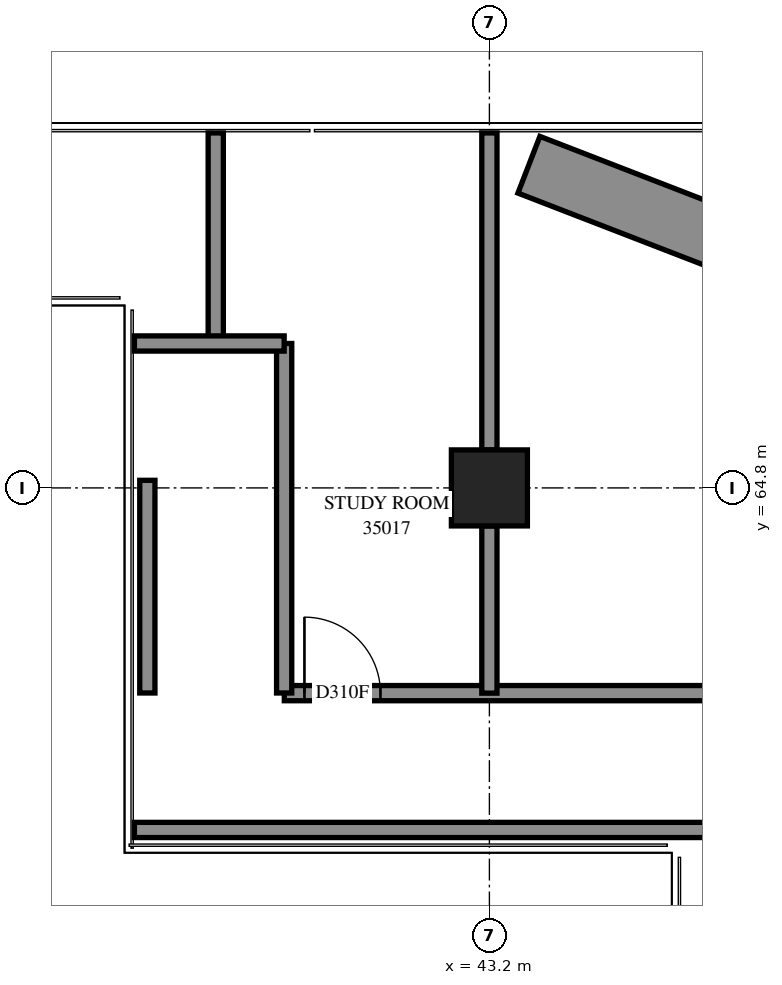
"""IFC4 building model, lengths in metres.
Left out: names, types, materials, properties, quantities, classifications, styles, units other than length and angle.
Written with IfcOpenShell. Run it as: python <this file> out.ifc"""

import sys

from ifc_helpers import new_model, si_unit, direction, frame, frame_2d, origin, origin_2d, place, context, subcontext, project, spatial, rectangle, extrude, element, fill, save


model = new_model("IFC4")
c1 = context("Model", 3, precision=1e-05, world=origin(), true_north=direction((0.0, 1.0)))
c2 = subcontext(c1, "Body", "Model", "MODEL_VIEW")
j1 = project(units=[si_unit("LENGTHUNIT", "METRE"), si_unit("PLANEANGLEUNIT", "RADIAN")], contexts=[c1])
p1 = place(None, origin())
s1 = spatial("IfcSite", under=j1, at=p1, CompositionType="ELEMENT")
p2 = place(p1, origin())
s2 = spatial("IfcBuilding", under=s1, at=p2, CompositionType="ELEMENT")
p3 = place(p2, frame((0.0, 0.0, 131.2)))
s3 = spatial("IfcBuildingStorey", under=s2, at=p3, CompositionType="ELEMENT", Elevation=131.2)
p4 = place(p3, frame((43.2, 64.8, 0.0), z_axis=(0.0, 0.0, 1.0), x_axis=(1.0, 0.0, 0.0)))
e1 = element("IfcColumn", 1, at=p4, inside=s3, PredefinedType="COLUMN", context=c2, shape_type="SweptSolid", body=[
    extrude(rectangle(XDim=1.0, YDim=1.0, at=origin_2d()), origin(), (0.0, 0.0, 1.0), 3.9),
])
p5 = place(p3, frame((46.26, 68.069, 0.0), z_axis=(0.0, 0.0, 1.0), x_axis=(-0.9326139528, 0.3608756227, 0.0)))
e2 = element("IfcWall", 2, at=p5, inside=s3, PredefinedType="SOLIDWALL", context=c2, shape_type="SweptSolid", body=[
    extrude(rectangle(XDim=2.723, YDim=0.8, at=frame_2d((1.362, 0.0))), origin(), (0.0, 0.0, 1.0), 0.65),
])
p6 = place(p3, frame((40.502, 62.1, 0.0), z_axis=(0.0, 0.0, 1.0), x_axis=(1.0, 0.0, 0.0)))
e3 = element("IfcWall", 3, at=p6, inside=s3, PredefinedType="PARTITIONING", context=c2, shape_type="SweptSolid", body=[
    extrude(rectangle(XDim=14.598, YDim=0.2, at=frame_2d((7.299, 0.0))), origin(), (0.0, 0.0, 1.0), 3.9),
])
p7 = place(p6, frame((0.265, 0.0, 0.0)))
e4 = element("IfcOpeningElement", 4, at=p7, cuts=e3, PredefinedType="OPENING", context=c2, shape_type="SweptSolid", body=[
    extrude(rectangle(XDim=1.0, YDim=2.1, at=frame_2d((0.5, 1.05))), frame((0.0, 0.11, 0.0), z_axis=(0.0, -1.0, 0.0), x_axis=(1.0, 0.0, 0.0)), (0.0, 0.0, 1.0), 0.22),
])
p8 = place(p6, frame((11.991, 0.0, 0.0)))
e5 = element("IfcOpeningElement", 5, at=p8, cuts=e3, PredefinedType="OPENING", context=c2, shape_type="SweptSolid", body=[
    extrude(rectangle(XDim=1.0, YDim=2.1, at=frame_2d((0.5, 1.05))), frame((0.0, 0.11, 0.0), z_axis=(0.0, -1.0, 0.0), x_axis=(1.0, 0.0, 0.0)), (0.0, 0.0, 1.0), 0.22),
])
p9 = place(p3, frame((38.53, 60.3, 0.0), z_axis=(0.0, 0.0, 1.0), x_axis=(1.0, 0.0, 0.0)))
e6 = element("IfcWall", 6, at=p9, inside=s3, PredefinedType="PARTITIONING", context=c2, shape_type="SweptSolid", body=[
    extrude(rectangle(XDim=14.57, YDim=0.2, at=frame_2d((7.285, 0.0))), origin(), (0.0, 0.0, 1.0), 3.9),
])
p10 = place(p9, frame((9.105, 0.0, 0.0)))
e7 = element("IfcOpeningElement", 7, at=p10, cuts=e6, PredefinedType="OPENING", context=c2, shape_type="SweptSolid", body=[
    extrude(rectangle(XDim=1.0, YDim=2.1, at=frame_2d((0.5, 1.05))), frame((0.0, 0.11, 0.0), z_axis=(0.0, -1.0, 0.0), x_axis=(1.0, 0.0, 0.0)), (0.0, 0.0, 1.0), 0.22),
])
p11 = place(p9, frame((13.426, 0.0, 0.0)))
e8 = element("IfcOpeningElement", 8, at=p11, cuts=e6, PredefinedType="OPENING", context=c2, shape_type="SweptSolid", body=[
    extrude(rectangle(XDim=1.0, YDim=2.1, at=frame_2d((0.5, 1.05))), frame((0.0, 0.11, 0.0), z_axis=(0.0, -1.0, 0.0), x_axis=(1.0, 0.0, 0.0)), (0.0, 0.0, 1.0), 0.22),
])
p12 = place(p3, frame((40.5, 62.102, 0.0), z_axis=(0.0, 0.0, 1.0), x_axis=(0.0, 1.0, 0.0)))
e9 = element("IfcWall", 9, at=p12, inside=s3, PredefinedType="PARTITIONING", context=c2, shape_type="SweptSolid", body=[
    extrude(rectangle(XDim=4.598, YDim=0.2, at=frame_2d((2.299, 0.0))), origin(), (0.0, 0.0, 1.0), 3.9),
])
p13 = place(p3, frame((43.2, 65.3, 0.0), z_axis=(0.0, 0.0, 1.0), x_axis=(0.0, 1.0, 0.0)))
e10 = element("IfcWall", 10, at=p13, inside=s3, PredefinedType="PARTITIONING", context=c2, shape_type="SweptSolid", body=[
    extrude(rectangle(XDim=4.17, YDim=0.2, at=frame_2d((2.085, 0.0))), origin(), (0.0, 0.0, 1.0), 3.9),
])
p14 = place(p3, frame((38.7, 62.102, 0.0), z_axis=(0.0, 0.0, 1.0), x_axis=(0.0, 1.0, 0.0)))
e11 = element("IfcWall", 11, at=p14, inside=s3, PredefinedType="PARTITIONING", context=c2, shape_type="SweptSolid", body=[
    extrude(rectangle(XDim=2.798, YDim=0.2, at=frame_2d((1.399, 0.0))), origin(), (0.0, 0.0, 1.0), 3.9),
])
p15 = place(p3, frame((39.6, 66.7, 0.0), z_axis=(0.0, 0.0, 1.0), x_axis=(0.0, 1.0, 0.0)))
e12 = element("IfcWall", 12, at=p15, inside=s3, PredefinedType="PARTITIONING", context=c2, shape_type="SweptSolid", body=[
    extrude(rectangle(XDim=2.77, YDim=0.2, at=frame_2d((1.385, 0.0))), origin(), (0.0, 0.0, 1.0), 3.9),
])
p16 = place(p3, frame((43.2, 62.1, 0.0), z_axis=(0.0, 0.0, 1.0), x_axis=(0.0, 1.0, 0.0)))
e13 = element("IfcWall", 13, at=p16, inside=s3, PredefinedType="PARTITIONING", context=c2, shape_type="SweptSolid", body=[
    extrude(rectangle(XDim=2.2, YDim=0.2, at=frame_2d((1.1, 0.0))), origin(), (0.0, 0.0, 1.0), 3.9),
])
p17 = place(p3, frame((38.53, 66.7, 0.0), z_axis=(0.0, 0.0, 1.0), x_axis=(1.0, 0.0, 0.0)))
e14 = element("IfcWall", 14, at=p17, inside=s3, PredefinedType="PARTITIONING", context=c2, shape_type="SweptSolid", body=[
    extrude(rectangle(XDim=1.97, YDim=0.2, at=frame_2d((0.985, 0.0))), origin(), (0.0, 0.0, 1.0), 3.9),
])
p18 = place(p7, origin())
e15 = element("IfcDoor", 15, at=p18, inside=s3, OperationType="SINGLE_SWING_LEFT", PredefinedType="DOOR", context=c2, shape_type="SweptSolid", body=[
    extrude(rectangle(XDim=1.0, YDim=2.1, at=frame_2d((0.5, 1.05))), frame((0.0, 0.025, 0.0), z_axis=(0.0, -1.0, 0.0), x_axis=(1.0, 0.0, 0.0)), (0.0, 0.0, 1.0), 0.05),
])
fill(e4, e15)
save(model, sys.argv[1])
